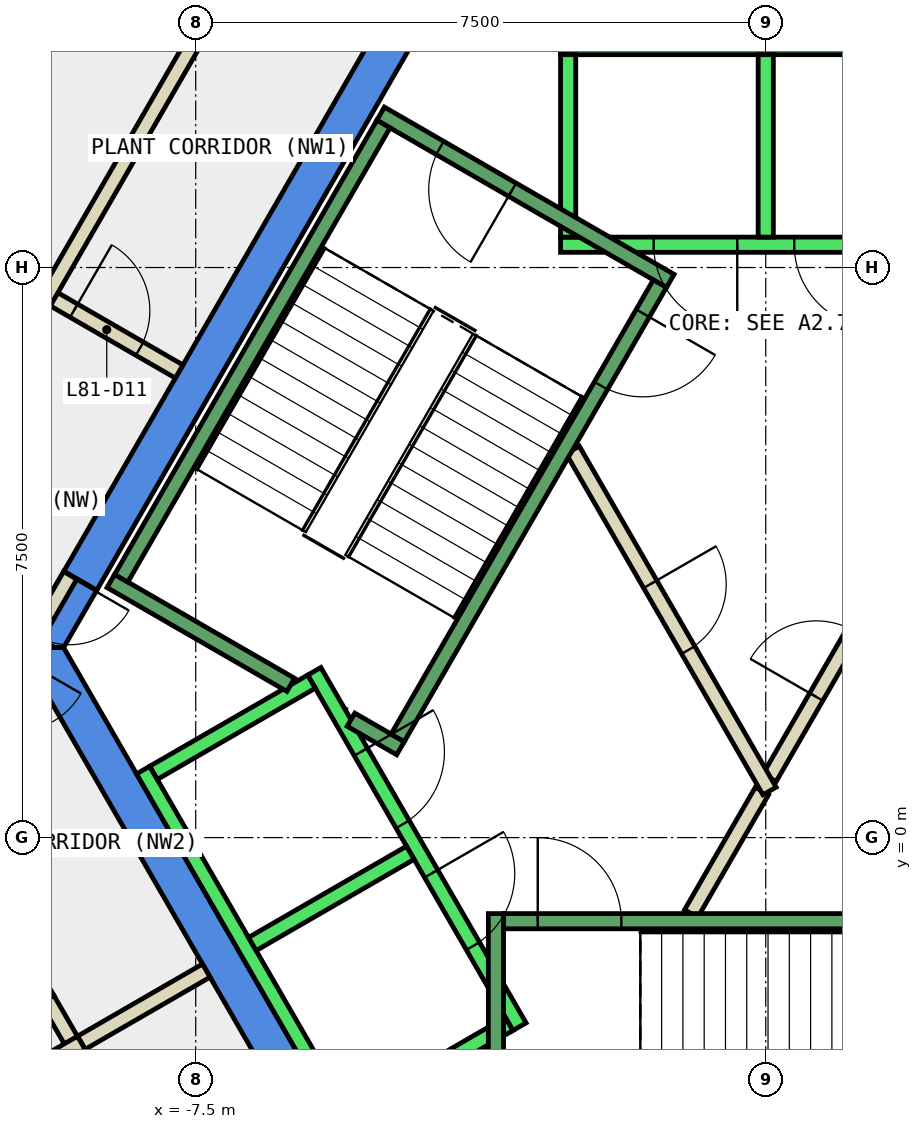
"""IFC4 building model, lengths in metres.
Left out: names, types, materials, properties, quantities, classifications, styles, units other than length and angle.
Written with IfcOpenShell. Run it as: python <this file> out.ifc"""

import sys

from ifc_helpers import new_model, si_unit, direction, frame, frame_2d, origin, place, context, subcontext, project, spatial, polyline, rectangle, outline, extrude, element, fill, save


model = new_model("IFC4")
c1 = context("Model", 3, precision=1e-05, world=origin(), true_north=direction((0.0, 1.0)))
c2 = subcontext(c1, "Body", "Model", "MODEL_VIEW")
j1 = project(units=[si_unit("LENGTHUNIT", "METRE"), si_unit("PLANEANGLEUNIT", "RADIAN")], contexts=[c1])
p1 = place(None, origin())
s1 = spatial("IfcSite", under=j1, at=p1, CompositionType="ELEMENT")
p2 = place(p1, origin())
s2 = spatial("IfcBuilding", under=s1, at=p2, CompositionType="ELEMENT")
p3 = place(p2, frame((0.0, 0.0, 344.9)))
s3 = spatial("IfcBuildingStorey", under=s2, at=p3, CompositionType="ELEMENT", Elevation=344.9)
p4 = place(p3, frame((0.0, 0.0, -0.35)))
e1 = element("IfcWall", 1, at=p4, inside=s3, PredefinedType="SHEAR", context=c2, shape_type="SweptSolid", body=[
    extrude(outline(polyline([(-9.236, 3.502), (-8.803, 3.253), (-4.619, 10.5), (-4.907, 11.0), (-9.236, 3.502)])), origin(), (0.0, 0.0, 1.0), 4.4),
])
p5 = place(p3, frame((0.0, 0.0, 3.6)))
e2 = element("IfcWall", 2, at=p5, inside=s3, PredefinedType="SHEAR", context=c2, shape_type="SweptSolid", body=[
    extrude(outline(polyline([(-9.7, 2.7), (-9.354, 2.5), (-9.238, 2.5), (-8.803, 3.253), (-9.236, 3.502), (-9.7, 2.7)])), origin(), (0.0, 0.0, 1.0), 0.45),
])
p6 = place(p3, frame((0.0, 0.0, -0.35)))
e3 = element("IfcWall", 3, at=p6, inside=s3, PredefinedType="SHEAR", context=c2, shape_type="SweptSolid", body=[
    extrude(outline(polyline([(-9.815, 2.5), (-4.907, -6.0), (-4.619, -5.5), (-9.238, 2.5), (-9.815, 2.5)])), origin(), (0.0, 0.0, 1.0), 4.4),
])
p7 = place(p3, frame((-9.347, 13.339, 0.0), z_axis=(0.0, 0.0, 1.0), x_axis=(-0.510686403068, -0.859767060152, 0.0)))
e4 = element("IfcWall", 4, at=p7, inside=s3, PredefinedType="STANDARD", context=c2, shape_type="SweptSolid", body=[
    extrude(rectangle(XDim=6.38, YDim=0.3, at=frame_2d((3.19, 0.0))), origin(), (0.0, 0.0, 1.0), 4.05),
])
p8 = place(p7, frame((0.595, 0.0, 0.9)))
e5 = element("IfcOpeningElement", 5, at=p8, cuts=e4, PredefinedType="OPENING", context=c2, shape_type="SweptSolid", body=[
    extrude(rectangle(XDim=2.0, YDim=3.0, at=frame_2d((1.0, 1.5))), frame((0.0, 0.16, 0.0), z_axis=(0.0, -1.0, 0.0), x_axis=(1.0, 0.0, 0.0)), (0.0, 0.0, 1.0), 0.32),
])
p9 = place(p7, frame((3.785, 0.0, 0.9)))
e6 = element("IfcOpeningElement", 6, at=p9, cuts=e4, PredefinedType="OPENING", context=c2, shape_type="SweptSolid", body=[
    extrude(rectangle(XDim=2.0, YDim=3.0, at=frame_2d((1.0, 1.5))), frame((0.0, 0.16, 0.0), z_axis=(0.0, -1.0, 0.0), x_axis=(1.0, 0.0, 0.0)), (0.0, 0.0, 1.0), 0.32),
])
p10 = place(p3, frame((-0.982, -1.0, 0.0), z_axis=(0.0, 0.0, 1.0), x_axis=(0.50024047865, 0.865886518847, 0.0)))
e7 = element("IfcWall", 7, at=p10, inside=s3, PredefinedType="PARTITIONING", context=c2, shape_type="SweptSolid", body=[
    extrude(rectangle(XDim=1.863, YDim=0.2, at=frame_2d((0.931, 0.0))), origin(), (0.0, 0.0, 1.0), 4.05),
])
p11 = place(p3, frame((0.05, 0.787, 0.0), z_axis=(0.0, 0.0, 1.0), x_axis=(0.499954076797, 0.866051915934, 0.0)))
e8 = element("IfcWall", 8, at=p11, inside=s3, PredefinedType="PARTITIONING", context=c2, shape_type="SweptSolid", body=[
    extrude(rectangle(XDim=3.558, YDim=0.2, at=frame_2d((1.779, 0.0))), origin(), (0.0, 0.0, 1.0), 4.05),
])
p12 = place(p11, frame((1.229, 0.0, 0.0)))
e9 = element("IfcOpeningElement", 9, at=p12, cuts=e8, PredefinedType="OPENING", context=c2, shape_type="SweptSolid", body=[
    extrude(rectangle(XDim=1.0, YDim=2.1, at=frame_2d((0.5, 1.05))), frame((0.0, 0.11, 0.0), z_axis=(0.0, -1.0, 0.0), x_axis=(1.0, 0.0, 0.0)), (0.0, 0.0, 1.0), 0.22),
])
p13 = place(p3, frame((-2.54, 5.1, 0.0), z_axis=(0.0, 0.0, 1.0), x_axis=(0.499925051871, -0.866068670783, 0.0)))
e10 = element("IfcWall", 10, at=p13, inside=s3, PredefinedType="PARTITIONING", context=c2, shape_type="SweptSolid", body=[
    extrude(rectangle(XDim=5.181, YDim=0.2, at=frame_2d((2.59, 0.0))), origin(), (0.0, 0.0, 1.0), 4.05),
])
p14 = place(p13, frame((2.04, 0.0, 0.0)))
e11 = element("IfcOpeningElement", 11, at=p14, cuts=e10, PredefinedType="OPENING", context=c2, shape_type="SweptSolid", body=[
    extrude(rectangle(XDim=1.0, YDim=2.1, at=frame_2d((0.5, 1.05))), frame((0.0, 0.11, 0.0), z_axis=(0.0, -1.0, 0.0), x_axis=(1.0, 0.0, 0.0)), (0.0, 0.0, 1.0), 0.22),
])
p15 = place(p3, frame((-9.006, -2.7, 0.0), z_axis=(0.0, 0.0, 1.0), x_axis=(0.865980106173, 0.500078449558, 0.0)))
e12 = element("IfcWall", 12, at=p15, inside=s3, PredefinedType="PARTITIONING", context=c2, shape_type="SweptSolid", body=[
    extrude(rectangle(XDim=1.9, YDim=0.2, at=frame_2d((0.95, 0.0))), origin(), (0.0, 0.0, 1.0), 4.05),
])
p16 = place(p3, frame((-9.45, 7.132, 0.0), z_axis=(0.0, 0.0, 1.0), x_axis=(0.866010750942, -0.50002537861, 0.0)))
e13 = element("IfcWall", 13, at=p16, inside=s3, PredefinedType="PARTITIONING", context=c2, shape_type="SweptSolid", body=[
    extrude(rectangle(XDim=2.0, YDim=0.2, at=frame_2d((1.0, 0.0))), origin(), (0.0, 0.0, 1.0), 4.05),
])
p17 = place(p16, frame((0.4, 0.0, 0.0)))
e14 = element("IfcOpeningElement", 14, at=p17, cuts=e13, PredefinedType="OPENING", context=c2, shape_type="SweptSolid", body=[
    extrude(rectangle(XDim=1.0, YDim=2.1, at=frame_2d((0.5, 1.05))), frame((0.0, 0.11, 0.0), z_axis=(0.0, -1.0, 0.0), x_axis=(1.0, 0.0, 0.0)), (0.0, 0.0, 1.0), 0.22),
])
p18 = place(p3, frame((-9.5, 7.045, 0.0), z_axis=(0.0, 0.0, 1.0), x_axis=(0.500052367415, 0.865995167332, 0.0)))
e15 = element("IfcWall", 15, at=p18, inside=s3, PredefinedType="PARTITIONING", context=c2, shape_type="SweptSolid", body=[
    extrude(rectangle(XDim=4.569, YDim=0.2, at=frame_2d((2.285, 0.0))), origin(), (0.0, 0.0, 1.0), 4.05),
])
p19 = place(p3, frame((-9.093, -2.75, 0.0), z_axis=(0.0, 0.0, 1.0), x_axis=(-0.500153222552, 0.865936922628, 0.0)))
e16 = element("IfcWall", 16, at=p19, inside=s3, PredefinedType="PARTITIONING", context=c2, shape_type="SweptSolid", body=[
    extrude(rectangle(XDim=0.719, YDim=0.2, at=frame_2d((0.36, 0.0))), origin(), (0.0, 0.0, 1.0), 4.05),
])
p20 = place(p3, frame((-9.15, 3.452, 0.0), z_axis=(0.0, 0.0, 1.0), x_axis=(-0.500079945886, -0.865979242085, 0.0)))
e17 = element("IfcWall", 17, at=p20, inside=s3, PredefinedType="PARTITIONING", context=c2, shape_type="SweptSolid", body=[
    extrude(rectangle(XDim=0.926, YDim=0.2, at=frame_2d((0.463, 0.0))), origin(), (0.0, 0.0, 1.0), 2.4),
])
p21 = place(p20, frame((0.017, 0.0, 0.0)))
e18 = element("IfcOpeningElement", 18, at=p21, cuts=e17, PredefinedType="OPENING", context=c2, shape_type="SweptSolid", body=[
    extrude(rectangle(XDim=0.9, YDim=2.1, at=frame_2d((0.45, 1.05))), frame((0.0, 0.11, 0.0), z_axis=(0.0, -1.0, 0.0), x_axis=(1.0, 0.0, 0.0)), (0.0, 0.0, 1.0), 0.22),
])
p22 = place(p3, frame((-8.185, -4.322, 0.0), z_axis=(0.0, 0.0, 1.0), x_axis=(-0.500145398563, 0.865941441609, 0.0)))
e19 = element("IfcWall", 19, at=p22, inside=s3, PredefinedType="PARTITIONING", context=c2, shape_type="SweptSolid", body=[
    extrude(rectangle(XDim=1.815, YDim=0.2, at=frame_2d((0.908, 0.0))), origin(), (0.0, 0.0, 1.0), 4.05),
])
p23 = place(p3, frame((-18.407, -8.127, 0.0), z_axis=(0.0, 0.0, 1.0), x_axis=(0.866049258168, 0.49995868072, 0.0)))
e20 = element("IfcWall", 20, at=p23, inside=s3, PredefinedType="PARTITIONING", context=c2, shape_type="SweptSolid", body=[
    extrude(rectangle(XDim=10.855, YDim=0.2, at=frame_2d((5.427, 0.0))), origin(), (0.0, 0.0, 1.0), 4.05),
])
p24 = place(p3, frame((-9.453, -2.127, 0.0), z_axis=(0.0, 0.0, 1.0), x_axis=(-0.499508606083, 0.866308924373, 0.0)))
e21 = element("IfcWall", 21, at=p24, inside=s3, PredefinedType="PARTITIONING", context=c2, shape_type="SweptSolid", body=[
    extrude(rectangle(XDim=0.725, YDim=0.2, at=frame_2d((0.362, 0.0))), origin(), (0.0, 0.0, 1.0), 1.95),
])
p25 = place(p3, frame((2.7, 7.8, 0.0), z_axis=(0.0, 0.0, 1.0), x_axis=(-1.0, 0.0, 0.0)))
e22 = element("IfcWall", 22, at=p25, inside=s3, PredefinedType="STANDARD", context=c2, shape_type="SweptSolid", body=[
    extrude(rectangle(XDim=5.4, YDim=0.2, at=frame_2d((2.7, 0.0))), origin(), (0.0, 0.0, 1.0), 4.05),
])
p26 = place(p25, frame((1.225, 0.0, 0.0)))
e23 = element("IfcOpeningElement", 23, at=p26, cuts=e22, PredefinedType="OPENING", context=c2, shape_type="SweptSolid", body=[
    extrude(rectangle(XDim=1.1, YDim=2.1, at=frame_2d((0.55, 1.05))), frame((0.0, 0.11, 0.0), z_axis=(0.0, -1.0, 0.0), x_axis=(1.0, 0.0, 0.0)), (0.0, 0.0, 1.0), 0.22),
])
p27 = place(p25, frame((3.075, 0.0, 0.0)))
e24 = element("IfcOpeningElement", 24, at=p27, cuts=e22, PredefinedType="OPENING", context=c2, shape_type="SweptSolid", body=[
    extrude(rectangle(XDim=1.1, YDim=2.1, at=frame_2d((0.55, 1.05))), frame((0.0, 0.11, 0.0), z_axis=(0.0, -1.0, 0.0), x_axis=(1.0, 0.0, 0.0)), (0.0, 0.0, 1.0), 0.22),
])
p28 = place(p3, frame((2.7, 10.4, 0.0), z_axis=(0.0, 0.0, 1.0), x_axis=(-1.0, 0.0, 0.0)))
e25 = element("IfcWall", 25, at=p28, inside=s3, PredefinedType="STANDARD", context=c2, shape_type="SweptSolid", body=[
    extrude(rectangle(XDim=5.4, YDim=0.2, at=frame_2d((2.7, 0.0))), origin(), (0.0, 0.0, 1.0), 4.05),
])
for number, where, z_axis, x_axis in (
    (26, (0.0, 7.9, 0.0), (0.0, 0.0, 1.0), (0.0, 1.0, 0.0)),
    (27, (-2.6, 7.9, 0.0), (0.0, 0.0, 1.0), (0.0, 1.0, 0.0)),
):
    element("IfcWall", number, at=place(p3, frame(where, z_axis=z_axis, x_axis=x_axis)), inside=s3, PredefinedType="STANDARD", context=c2, shape_type="SweptSolid", body=[
        extrude(rectangle(XDim=2.4, YDim=0.2, at=frame_2d((1.2, 0.0))), origin(), (0.0, 0.0, 1.0), 4.05),
    ])
p29 = place(p3, frame((-5.94, 2.188, 0.0), z_axis=(0.0, 0.0, 1.0), x_axis=(0.500034260056, -0.866005622828, 0.0)))
e28 = element("IfcWall", 28, at=p29, inside=s3, PredefinedType="STANDARD", context=c2, shape_type="SweptSolid", body=[
    extrude(rectangle(XDim=5.399, YDim=0.2, at=frame_2d((2.7, 0.0))), origin(), (0.0, 0.0, 1.0), 4.05),
])
p30 = place(p29, frame((3.075, 0.0, 0.0)))
e29 = element("IfcOpeningElement", 29, at=p30, cuts=e28, PredefinedType="OPENING", context=c2, shape_type="SweptSolid", body=[
    extrude(rectangle(XDim=1.1, YDim=2.1, at=frame_2d((0.55, 1.05))), frame((0.0, 0.11, 0.0), z_axis=(0.0, -1.0, 0.0), x_axis=(1.0, 0.0, 0.0)), (0.0, 0.0, 1.0), 0.22),
])
p31 = place(p29, frame((1.225, 0.0, 0.0)))
e30 = element("IfcOpeningElement", 30, at=p31, cuts=e28, PredefinedType="OPENING", context=c2, shape_type="SweptSolid", body=[
    extrude(rectangle(XDim=1.1, YDim=2.1, at=frame_2d((0.55, 1.05))), frame((0.0, 0.11, 0.0), z_axis=(0.0, -1.0, 0.0), x_axis=(1.0, 0.0, 0.0)), (0.0, 0.0, 1.0), 0.22),
])
p32 = place(p3, frame((-8.192, 0.888, 0.0), z_axis=(0.0, 0.0, 1.0), x_axis=(0.500034260056, -0.866005622828, 0.0)))
e31 = element("IfcWall", 31, at=p32, inside=s3, PredefinedType="STANDARD", context=c2, shape_type="SweptSolid", body=[
    extrude(rectangle(XDim=5.399, YDim=0.2, at=frame_2d((2.7, 0.0))), origin(), (0.0, 0.0, 1.0), 4.05),
])
for number, where, z_axis, x_axis in (
    (32, (-5.977, 2.052, 0.0), (0.0, 0.0, 1.0), (-0.866, -0.5, 0.0)),
    (33, (-4.677, -0.2, 0.0), (0.0, 0.0, 1.0), (-0.866, -0.5, 0.0)),
):
    element("IfcWall", number, at=place(p3, frame(where, z_axis=z_axis, x_axis=x_axis)), inside=s3, PredefinedType="STANDARD", context=c2, shape_type="SweptSolid", body=[
        extrude(rectangle(XDim=2.399, YDim=0.2, at=frame_2d((1.2, 0.0))), origin(), (0.0, 0.0, 1.0), 4.05),
    ])
p33 = place(p3, frame((-3.377, -2.452, 0.0), z_axis=(0.0, 0.0, 1.0), x_axis=(-0.865955154139, -0.50012165622, 0.0)))
e34 = element("IfcWall", 34, at=p33, inside=s3, PredefinedType="STANDARD", context=c2, shape_type="SweptSolid", body=[
    extrude(rectangle(XDim=2.4, YDim=0.2, at=frame_2d((1.2, 0.0))), origin(), (0.0, 0.0, 1.0), 4.05),
])
p34 = place(p3, frame((-3.55, -1.0, 0.0), z_axis=(0.0, 0.0, 1.0), x_axis=(0.0, -1.0, 0.0)))
e35 = element("IfcWall", 35, at=p34, inside=s3, PredefinedType="STANDARD", context=c2, shape_type="SweptSolid", body=[
    extrude(rectangle(XDim=4.4, YDim=0.2, at=frame_2d((2.2, 0.0))), origin(), (0.0, 0.0, 1.0), 4.05),
])
p35 = place(p34, frame((2.4, 0.0, 0.0)))
e36 = element("IfcOpeningElement", 36, at=p35, cuts=e35, PredefinedType="OPENING", context=c2, shape_type="SweptSolid", body=[
    extrude(rectangle(XDim=1.1, YDim=2.2, at=frame_2d((0.55, 1.1))), frame((0.0, 0.11, 0.0), z_axis=(0.0, -1.0, 0.0), x_axis=(1.0, 0.0, 0.0)), (0.0, 0.0, 1.0), 0.22),
])
p36 = place(p3, frame((-3.45, -1.1, 0.0), z_axis=(0.0, 0.0, 1.0), x_axis=(1.0, 0.0, 0.0)))
e37 = element("IfcWall", 37, at=p36, inside=s3, PredefinedType="STANDARD", context=c2, shape_type="SweptSolid", body=[
    extrude(rectangle(XDim=6.9, YDim=0.2, at=frame_2d((3.45, 0.0))), origin(), (0.0, 0.0, 1.0), 4.05),
])
p37 = place(p36, frame((0.45, 0.0, 0.0)))
e38 = element("IfcOpeningElement", 38, at=p37, cuts=e37, PredefinedType="OPENING", context=c2, shape_type="SweptSolid", body=[
    extrude(rectangle(XDim=1.1, YDim=2.2, at=frame_2d((0.55, 1.1))), frame((0.0, 0.11, 0.0), z_axis=(0.0, -1.0, 0.0), x_axis=(1.0, 0.0, 0.0)), (0.0, 0.0, 1.0), 0.22),
])
p38 = place(p3, frame((-1.256, 7.324, 0.0), z_axis=(0.0, 0.0, 1.0), x_axis=(-0.866046073146, 0.499964197906, 0.0)))
e39 = element("IfcWall", 39, at=p38, inside=s3, PredefinedType="STANDARD", context=c2, shape_type="SweptSolid", body=[
    extrude(rectangle(XDim=4.4, YDim=0.2, at=frame_2d((2.2, 0.0))), origin(), (0.0, 0.0, 1.0), 4.05),
])
p39 = place(p38, frame((2.4, 0.0, 0.0)))
e40 = element("IfcOpeningElement", 40, at=p39, cuts=e39, PredefinedType="OPENING", context=c2, shape_type="SweptSolid", body=[
    extrude(rectangle(XDim=1.1, YDim=2.2, at=frame_2d((0.55, 1.1))), frame((0.0, 0.11, 0.0), z_axis=(0.0, -1.0, 0.0), x_axis=(1.0, 0.0, 0.0)), (0.0, 0.0, 1.0), 0.22),
])
p40 = place(p3, frame((-6.25, 2.01, 0.0), z_axis=(0.0, 0.0, 1.0), x_axis=(-0.86611865017, 0.499838457731, 0.0)))
e41 = element("IfcWall", 41, at=p40, inside=s3, PredefinedType="STANDARD", context=c2, shape_type="SweptSolid", body=[
    extrude(rectangle(XDim=2.733, YDim=0.2, at=frame_2d((1.366, 0.0))), origin(), (0.0, 0.0, 1.0), 4.05),
])
p41 = place(p3, frame((-4.806, 1.176, 0.0), z_axis=(0.0, 0.0, 1.0), x_axis=(-0.866558586415, 0.499075361355, 0.0)))
e42 = element("IfcWall", 42, at=p41, inside=s3, PredefinedType="STANDARD", context=c2, shape_type="SweptSolid", body=[
    extrude(rectangle(XDim=0.751, YDim=0.2, at=frame_2d((0.376, 0.0))), origin(), (0.0, 0.0, 1.0), 4.05),
])
p42 = place(p3, frame((-1.393, 7.288, 0.0), z_axis=(0.0, 0.0, 1.0), x_axis=(-0.499963383562, -0.866046543262, 0.0)))
e43 = element("IfcWall", 43, at=p42, inside=s3, PredefinedType="STANDARD", context=c2, shape_type="SweptSolid", body=[
    extrude(rectangle(XDim=6.9, YDim=0.2, at=frame_2d((3.45, 0.0))), origin(), (0.0, 0.0, 1.0), 4.05),
])
p43 = place(p42, frame((0.45, 0.0, 0.0)))
e44 = element("IfcOpeningElement", 44, at=p43, cuts=e43, PredefinedType="OPENING", context=c2, shape_type="SweptSolid", body=[
    extrude(rectangle(XDim=1.1, YDim=2.2, at=frame_2d((0.55, 1.1))), frame((0.0, 0.11, 0.0), z_axis=(0.0, -1.0, 0.0), x_axis=(1.0, 0.0, 0.0)), (0.0, 0.0, 1.0), 0.22),
])
p44 = place(p3, frame((-5.03, 9.388, 0.0), z_axis=(0.0, 0.0, 1.0), x_axis=(-0.499978703459, -0.866037698999, 0.0)))
e45 = element("IfcWall", 45, at=p44, inside=s3, PredefinedType="STANDARD", context=c2, shape_type="SweptSolid", body=[
    extrude(rectangle(XDim=6.9, YDim=0.2, at=frame_2d((3.45, 0.0))), origin(), (0.0, 0.0, 1.0), 4.05),
])
p45 = place(p17, origin())
e46 = element("IfcDoor", 46, at=p45, inside=s3, OperationType="SINGLE_SWING_LEFT", PredefinedType="DOOR", context=c2, shape_type="SweptSolid", body=[
    extrude(rectangle(XDim=1.0, YDim=2.1, at=frame_2d((0.5, 1.05))), frame((0.0, 0.025, 0.0), z_axis=(0.0, -1.0, 0.0), x_axis=(1.0, 0.0, 0.0)), (0.0, 0.0, 1.0), 0.05),
])
fill(e14, e46)
p46 = place(p12, origin())
e47 = element("IfcDoor", 47, at=p46, inside=s3, OperationType="SINGLE_SWING_RIGHT", PredefinedType="DOOR", context=c2, shape_type="SweptSolid", body=[
    extrude(rectangle(XDim=1.0, YDim=2.1, at=frame_2d((0.5, 1.05))), frame((0.0, 0.025, 0.0), z_axis=(0.0, -1.0, 0.0), x_axis=(1.0, 0.0, 0.0)), (0.0, 0.0, 1.0), 0.05),
])
fill(e9, e47)
p47 = place(p14, origin())
e48 = element("IfcDoor", 48, at=p47, inside=s3, OperationType="SINGLE_SWING_RIGHT", PredefinedType="DOOR", context=c2, shape_type="SweptSolid", body=[
    extrude(rectangle(XDim=1.0, YDim=2.1, at=frame_2d((0.5, 1.05))), frame((0.0, 0.025, 0.0), z_axis=(0.0, -1.0, 0.0), x_axis=(1.0, 0.0, 0.0)), (0.0, 0.0, 1.0), 0.05),
])
fill(e11, e48)
p48 = place(p21, origin())
e49 = element("IfcDoor", 49, at=p48, inside=s3, OperationType="SINGLE_SWING_LEFT", PredefinedType="DOOR", context=c2, shape_type="SweptSolid", body=[
    extrude(rectangle(XDim=0.9, YDim=2.1, at=frame_2d((0.45, 1.05))), frame((0.0, 0.025, 0.0), z_axis=(0.0, -1.0, 0.0), x_axis=(1.0, 0.0, 0.0)), (0.0, 0.0, 1.0), 0.05),
])
fill(e18, e49)
p49 = place(p26, origin())
e50 = element("IfcDoor", 50, at=p49, inside=s3, OperationType="SLIDING_TO_LEFT", PredefinedType="DOOR", context=c2, shape_type="SweptSolid", body=[
    extrude(rectangle(XDim=1.1, YDim=2.1, at=frame_2d((0.55, 1.05))), frame((0.0, 0.025, 0.0), z_axis=(0.0, -1.0, 0.0), x_axis=(1.0, 0.0, 0.0)), (0.0, 0.0, 1.0), 0.05),
])
fill(e23, e50)
p50 = place(p27, origin())
e51 = element("IfcDoor", 51, at=p50, inside=s3, OperationType="SLIDING_TO_LEFT", PredefinedType="DOOR", context=c2, shape_type="SweptSolid", body=[
    extrude(rectangle(XDim=1.1, YDim=2.1, at=frame_2d((0.55, 1.05))), frame((0.0, 0.025, 0.0), z_axis=(0.0, -1.0, 0.0), x_axis=(1.0, 0.0, 0.0)), (0.0, 0.0, 1.0), 0.05),
])
fill(e24, e51)
p51 = place(p30, origin())
e52 = element("IfcDoor", 52, at=p51, inside=s3, OperationType="SLIDING_TO_LEFT", PredefinedType="DOOR", context=c2, shape_type="SweptSolid", body=[
    extrude(rectangle(XDim=1.1, YDim=2.1, at=frame_2d((0.55, 1.05))), frame((0.0, 0.025, 0.0), z_axis=(0.0, -1.0, 0.0), x_axis=(1.0, 0.0, 0.0)), (0.0, 0.0, 1.0), 0.05),
])
fill(e29, e52)
p52 = place(p31, origin())
e53 = element("IfcDoor", 53, at=p52, inside=s3, OperationType="SLIDING_TO_LEFT", PredefinedType="DOOR", context=c2, shape_type="SweptSolid", body=[
    extrude(rectangle(XDim=1.1, YDim=2.1, at=frame_2d((0.55, 1.05))), frame((0.0, 0.025, 0.0), z_axis=(0.0, -1.0, 0.0), x_axis=(1.0, 0.0, 0.0)), (0.0, 0.0, 1.0), 0.05),
])
fill(e30, e53)
p53 = place(p37, origin())
e54 = element("IfcDoor", 54, at=p53, inside=s3, OperationType="SINGLE_SWING_LEFT", PredefinedType="DOOR", context=c2, shape_type="SweptSolid", body=[
    extrude(rectangle(XDim=1.1, YDim=2.2, at=frame_2d((0.55, 1.1))), frame((0.0, 0.025, 0.0), z_axis=(0.0, -1.0, 0.0), x_axis=(1.0, 0.0, 0.0)), (0.0, 0.0, 1.0), 0.05),
])
fill(e38, e54)
p54 = place(p43, origin())
e55 = element("IfcDoor", 55, at=p54, inside=s3, OperationType="SINGLE_SWING_LEFT", PredefinedType="DOOR", context=c2, shape_type="SweptSolid", body=[
    extrude(rectangle(XDim=1.1, YDim=2.2, at=frame_2d((0.55, 1.1))), frame((0.0, 0.025, 0.0), z_axis=(0.0, -1.0, 0.0), x_axis=(1.0, 0.0, 0.0)), (0.0, 0.0, 1.0), 0.05),
])
fill(e44, e55)
p55 = place(p39, origin())
e56 = element("IfcDoor", 56, at=p55, inside=s3, OperationType="SINGLE_SWING_LEFT", PredefinedType="DOOR", context=c2, shape_type="SweptSolid", body=[
    extrude(rectangle(XDim=1.1, YDim=2.2, at=frame_2d((0.55, 1.1))), frame((0.0, 0.025, 0.0), z_axis=(0.0, -1.0, 0.0), x_axis=(1.0, 0.0, 0.0)), (0.0, 0.0, 1.0), 0.05),
])
fill(e40, e56)
save(model, sys.argv[1])
